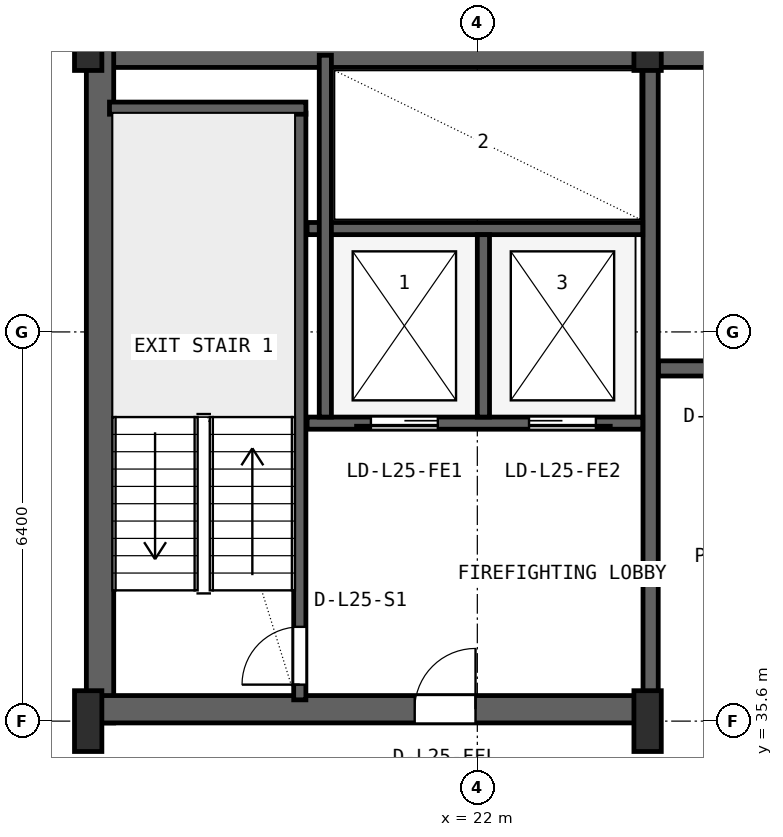
"""IFC4 building model, lengths in metres.
Left out: names, types, materials, properties, quantities, classifications, styles, units other than length and angle.
Written with IfcOpenShell. Run it as: python <this file> out.ifc"""

import sys

from ifc_helpers import new_model, si_unit, direction, frame, frame_2d, origin, origin_2d, place, context, subcontext, project, spatial, rectangle, i_section, extrude, source, transform, mapped, element, fill, save


model = new_model("IFC4")
c1 = context("Model", 3, precision=1e-05, world=origin(), true_north=direction((0.0, 1.0)))
c2 = subcontext(c1, "Body", "Model", "MODEL_VIEW")
j1 = project(units=[si_unit("LENGTHUNIT", "METRE"), si_unit("PLANEANGLEUNIT", "RADIAN")], contexts=[c1])
p1 = place(None, origin())
s1 = spatial("IfcSite", under=j1, at=p1, CompositionType="ELEMENT")
p2 = place(p1, origin())
s2 = spatial("IfcBuilding", under=s1, at=p2, CompositionType="ELEMENT")
p3 = place(p2, frame((0.0, 0.0, 106.8)))
s3 = spatial("IfcBuildingStorey", under=s2, at=p3, CompositionType="ELEMENT", Elevation=106.8)
p4 = place(p3, frame((15.6, 46.575, 0.0), z_axis=(0.0, 0.0, 1.0), x_axis=(1.0, 0.0, 0.0)))
e1 = element("IfcWall", 1, at=p4, inside=s3, PredefinedType="SHEAR", context=c2, shape_type="SweptSolid", body=[
    extrude(rectangle(XDim=36.8, YDim=0.45, at=frame_2d((18.4, 0.0))), origin(), (0.0, 0.0, 1.0), 3.55),
])
p5 = place(p3, frame((15.795, 35.57, 0.0), z_axis=(0.0, 0.0, 1.0), x_axis=(0.0, 1.0, 0.0)))
e2 = element("IfcWall", 2, at=p5, inside=s3, PredefinedType="SHEAR", context=c2, shape_type="SweptSolid", body=[
    extrude(rectangle(XDim=11.23, YDim=0.45, at=frame_2d((5.615, 0.0))), origin(), (0.0, 0.0, 1.0), 3.55),
])
p6 = place(p3, frame((15.57, 35.795, 0.0), z_axis=(0.0, 0.0, 1.0), x_axis=(1.0, 0.0, 0.0)))
e3 = element("IfcWall", 3, at=p6, inside=s3, PredefinedType="SHEAR", context=c2, shape_type="SweptSolid", body=[
    extrude(rectangle(XDim=9.23, YDim=0.45, at=frame_2d((4.615, 0.0))), origin(), (0.0, 0.0, 1.0), 3.55),
])
p7 = place(p6, frame((5.4, 0.0, 0.0)))
e4 = element("IfcOpeningElement", 4, at=p7, cuts=e3, PredefinedType="OPENING", context=c2, shape_type="SweptSolid", body=[
    extrude(rectangle(XDim=1.0, YDim=2.1, at=frame_2d((0.5, 1.05))), frame((0.0, 0.235, 0.0), z_axis=(0.0, -1.0, 0.0), x_axis=(1.0, 0.0, 0.0)), (0.0, 0.0, 1.0), 0.47),
])
m1 = source(origin(), c2, "Body", "SweptSolid", [
    extrude(i_section(OverallWidth=0.45, OverallDepth=1.0, WebThickness=0.016, FlangeThickness=0.03, FilletRadius=0.016, at=origin_2d()), origin(), (0.0, 0.0, 1.0), 3.8),
])
for number, where, z_axis, x_axis in (
    (5, (15.6, 35.6, 0.0), (0.0, 0.0, 1.0), (1.0, 0.0, 0.0)),
    (6, (15.6, 46.8, 0.0), (0.0, 0.0, 1.0), (1.0, 0.0, 0.0)),
    (7, (24.8, 35.6, 0.0), (0.0, 0.0, 1.0), (1.0, 0.0, 0.0)),
    (8, (24.8, 46.8, 0.0), (0.0, 0.0, 1.0), (1.0, 0.0, 0.0)),
):
    element("IfcColumn", number, at=place(p3, frame(where, z_axis=z_axis, x_axis=x_axis)), inside=s3, PredefinedType="COLUMN", context=c2, shape_type="MappedRepresentation", body=[
        mapped(m1, transform((0.0, 0.0, 0.0), x_axis=(1.0, 0.0, 0.0), y_axis=(0.0, 1.0, 0.0), z_axis=(0.0, 0.0, 1.0), scale=1.0)),
    ])
p8 = place(p3, frame((19.08, 35.95, 0.0), z_axis=(0.0, 0.0, 1.0), x_axis=(0.0, 1.0, 0.0)))
e9 = element("IfcWall", 9, at=p8, inside=s3, PredefinedType="SHEAR", context=c2, shape_type="SweptSolid", body=[
    extrude(rectangle(XDim=9.65, YDim=0.2, at=frame_2d((4.825, 0.0))), origin(), (0.0, 0.0, 1.0), 3.55),
])
p9 = place(p8, frame((0.25, 0.0, 0.0)))
e10 = element("IfcOpeningElement", 10, at=p9, cuts=e9, PredefinedType="OPENING", context=c2, shape_type="SweptSolid", body=[
    extrude(rectangle(XDim=0.95, YDim=2.1, at=frame_2d((0.475, 1.05))), frame((0.0, 0.11, 0.0), z_axis=(0.0, -1.0, 0.0), x_axis=(1.0, 0.0, 0.0)), (0.0, 0.0, 1.0), 0.22),
])
p10 = place(p3, frame((15.95, 45.68, 0.0), z_axis=(0.0, 0.0, 1.0), x_axis=(1.0, 0.0, 0.0)))
e11 = element("IfcWall", 11, at=p10, inside=s3, PredefinedType="SHEAR", context=c2, shape_type="SweptSolid", body=[
    extrude(rectangle(XDim=3.23, YDim=0.2, at=frame_2d((1.615, 0.0))), origin(), (0.0, 0.0, 1.0), 3.55),
])
p11 = place(p3, frame((24.85, 36.05, 0.0), z_axis=(0.0, 0.0, 1.0), x_axis=(0.0, 1.0, 0.0)))
e12 = element("IfcWall", 12, at=p11, inside=s3, PredefinedType="SHEAR", context=c2, shape_type="SweptSolid", body=[
    extrude(rectangle(XDim=10.45, YDim=0.25, at=frame_2d((5.225, 0.0))), origin(), (0.0, 0.0, 1.0), 3.55),
])
p12 = place(p3, frame((19.2, 40.5, 0.0), z_axis=(0.0, 0.0, 1.0), x_axis=(1.0, 0.0, 0.0)))
e13 = element("IfcWall", 13, at=p12, inside=s3, PredefinedType="SHEAR", context=c2, shape_type="SweptSolid", body=[
    extrude(rectangle(XDim=5.52, YDim=0.2, at=frame_2d((2.76, 0.0))), origin(), (0.0, 0.0, 1.0), 3.55),
])
p13 = place(p12, frame((1.05, 0.0, 0.0)))
e14 = element("IfcOpeningElement", 14, at=p13, cuts=e13, PredefinedType="OPENING", context=c2, shape_type="SweptSolid", body=[
    extrude(rectangle(XDim=1.1, YDim=2.18, at=frame_2d((0.55, 1.09))), frame((0.0, 0.11, 0.0), z_axis=(0.0, -1.0, 0.0), x_axis=(1.0, 0.0, 0.0)), (0.0, 0.0, 1.0), 0.22),
])
p14 = place(p12, frame((3.65, 0.0, 0.0)))
e15 = element("IfcOpeningElement", 15, at=p14, cuts=e13, PredefinedType="OPENING", context=c2, shape_type="SweptSolid", body=[
    extrude(rectangle(XDim=1.1, YDim=2.18, at=frame_2d((0.55, 1.09))), frame((0.0, 0.11, 0.0), z_axis=(0.0, -1.0, 0.0), x_axis=(1.0, 0.0, 0.0)), (0.0, 0.0, 1.0), 0.22),
])
p15 = place(p3, frame((19.2, 43.7, 0.0), z_axis=(0.0, 0.0, 1.0), x_axis=(1.0, 0.0, 0.0)))
e16 = element("IfcWall", 16, at=p15, inside=s3, PredefinedType="SHEAR", context=c2, shape_type="SweptSolid", body=[
    extrude(rectangle(XDim=5.52, YDim=0.2, at=frame_2d((2.76, 0.0))), origin(), (0.0, 0.0, 1.0), 3.55),
])
p16 = place(p3, frame((22.1, 40.6, 0.0), z_axis=(0.0, 0.0, 1.0), x_axis=(0.0, 1.0, 0.0)))
e17 = element("IfcWall", 17, at=p16, inside=s3, PredefinedType="SHEAR", context=c2, shape_type="SweptSolid", body=[
    extrude(rectangle(XDim=3.0, YDim=0.2, at=frame_2d((1.5, 0.0))), origin(), (0.0, 0.0, 1.0), 3.55),
])
p17 = place(p3, frame((19.5, 40.6, 0.0), z_axis=(0.0, 0.0, 1.0), x_axis=(0.0, 1.0, 0.0)))
e18 = element("IfcWall", 18, at=p17, inside=s3, PredefinedType="SHEAR", context=c2, shape_type="SweptSolid", body=[
    extrude(rectangle(XDim=5.95, YDim=0.2, at=frame_2d((2.975, 0.0))), origin(), (0.0, 0.0, 1.0), 3.55),
])
p18 = place(p3, frame((24.98, 41.4, 0.0), z_axis=(0.0, 0.0, 1.0), x_axis=(1.0, 0.0, 0.0)))
e19 = element("IfcWall", 19, at=p18, inside=s3, PredefinedType="SHEAR", context=c2, shape_type="SweptSolid", body=[
    extrude(rectangle(XDim=23.82, YDim=0.25, at=frame_2d((11.91, 0.0))), origin(), (0.0, 0.0, 1.0), 3.55),
])
p19 = place(p18, frame((8.87, 0.0, 0.0)))
e20 = element("IfcOpeningElement", 20, at=p19, cuts=e19, PredefinedType="OPENING", context=c2, shape_type="SweptSolid", body=[
    extrude(rectangle(XDim=1.1, YDim=2.18, at=frame_2d((0.55, 1.09))), frame((0.0, 0.135, 0.0), z_axis=(0.0, -1.0, 0.0), x_axis=(1.0, 0.0, 0.0)), (0.0, 0.0, 1.0), 0.27),
])
p20 = place(p18, frame((11.47, 0.0, 0.0)))
e21 = element("IfcOpeningElement", 21, at=p20, cuts=e19, PredefinedType="OPENING", context=c2, shape_type="SweptSolid", body=[
    extrude(rectangle(XDim=1.1, YDim=2.18, at=frame_2d((0.55, 1.09))), frame((0.0, 0.135, 0.0), z_axis=(0.0, -1.0, 0.0), x_axis=(1.0, 0.0, 0.0)), (0.0, 0.0, 1.0), 0.27),
])
p21 = place(p18, frame((14.07, 0.0, 0.0)))
e22 = element("IfcOpeningElement", 22, at=p21, cuts=e19, PredefinedType="OPENING", context=c2, shape_type="SweptSolid", body=[
    extrude(rectangle(XDim=1.1, YDim=2.18, at=frame_2d((0.55, 1.09))), frame((0.0, 0.135, 0.0), z_axis=(0.0, -1.0, 0.0), x_axis=(1.0, 0.0, 0.0)), (0.0, 0.0, 1.0), 0.27),
])
p22 = place(p18, frame((0.96, 0.0, 0.0)))
e23 = element("IfcOpeningElement", 23, at=p22, cuts=e19, PredefinedType="OPENING", context=c2, shape_type="SweptSolid", body=[
    extrude(rectangle(XDim=1.0, YDim=2.08, at=frame_2d((0.5, 1.04))), frame((0.0, 0.135, 0.0), z_axis=(0.0, -1.0, 0.0), x_axis=(1.0, 0.0, 0.0)), (0.0, 0.0, 1.0), 0.27),
])
p23 = place(p18, frame((3.56, 0.0, 0.0)))
e24 = element("IfcOpeningElement", 24, at=p23, cuts=e19, PredefinedType="OPENING", context=c2, shape_type="SweptSolid", body=[
    extrude(rectangle(XDim=1.0, YDim=2.08, at=frame_2d((0.5, 1.04))), frame((0.0, 0.135, 0.0), z_axis=(0.0, -1.0, 0.0), x_axis=(1.0, 0.0, 0.0)), (0.0, 0.0, 1.0), 0.27),
])
p24 = place(p18, frame((6.16, 0.0, 0.0)))
e25 = element("IfcOpeningElement", 25, at=p24, cuts=e19, PredefinedType="OPENING", context=c2, shape_type="SweptSolid", body=[
    extrude(rectangle(XDim=0.92, YDim=2.08, at=frame_2d((0.46, 1.04))), frame((0.0, 0.135, 0.0), z_axis=(0.0, -1.0, 0.0), x_axis=(1.0, 0.0, 0.0)), (0.0, 0.0, 1.0), 0.27),
])
m2 = source(origin(), c2, "Body", "SweptSolid", [
    extrude(rectangle(XDim=0.95, YDim=2.1, at=frame_2d((0.475, 1.05))), frame((0.0, 0.025, 0.0), z_axis=(0.0, -1.0, 0.0), x_axis=(1.0, 0.0, 0.0)), (0.0, 0.0, 1.0), 0.05),
])
p25 = place(p9, origin())
e26 = element("IfcDoor", 26, at=p25, inside=s3, OperationType="SINGLE_SWING_LEFT", PredefinedType="DOOR", context=c2, shape_type="MappedRepresentation", body=[
    mapped(m2, transform((0.0, 0.0, 0.0), x_axis=(1.0, 0.0, 0.0), y_axis=(0.0, 1.0, 0.0), z_axis=(0.0, 0.0, 1.0), scale=1.0)),
])
fill(e10, e26)
m3 = source(origin(), c2, "Body", "SweptSolid", [
    extrude(rectangle(XDim=1.0, YDim=2.1, at=frame_2d((0.5, 1.05))), frame((0.0, 0.025, 0.0), z_axis=(0.0, -1.0, 0.0), x_axis=(1.0, 0.0, 0.0)), (0.0, 0.0, 1.0), 0.05),
])
p26 = place(p7, origin())
e27 = element("IfcDoor", 27, at=p26, inside=s3, OperationType="SINGLE_SWING_RIGHT", PredefinedType="DOOR", context=c2, shape_type="MappedRepresentation", body=[
    mapped(m3, transform((0.0, 0.0, 0.0), x_axis=(1.0, 0.0, 0.0), y_axis=(0.0, 1.0, 0.0), z_axis=(0.0, 0.0, 1.0), scale=1.0)),
])
fill(e4, e27)
m4 = source(origin(), c2, "Body", "SweptSolid", [
    extrude(rectangle(XDim=1.1, YDim=2.18, at=frame_2d((0.55, 1.09))), frame((0.0, 0.025, 0.0), z_axis=(0.0, -1.0, 0.0), x_axis=(1.0, 0.0, 0.0)), (0.0, 0.0, 1.0), 0.05),
])
p27 = place(p13, frame((1.1, 0.0, 0.0), z_axis=(0.0, 0.0, 1.0), x_axis=(-1.0, 0.0, 0.0)))
e28 = element("IfcDoor", 28, at=p27, inside=s3, OperationType="SLIDING_TO_LEFT", PredefinedType="DOOR", context=c2, shape_type="MappedRepresentation", body=[
    mapped(m4, transform((0.0, 0.0, 0.0), x_axis=(1.0, 0.0, 0.0), y_axis=(0.0, 1.0, 0.0), z_axis=(0.0, 0.0, 1.0), scale=1.0)),
])
fill(e14, e28)
p28 = place(p14, frame((1.1, 0.0, 0.0), z_axis=(0.0, 0.0, 1.0), x_axis=(-1.0, 0.0, 0.0)))
e29 = element("IfcDoor", 29, at=p28, inside=s3, OperationType="SLIDING_TO_RIGHT", PredefinedType="DOOR", context=c2, shape_type="MappedRepresentation", body=[
    mapped(m4, transform((0.0, 0.0, 0.0), x_axis=(1.0, 0.0, 0.0), y_axis=(0.0, 1.0, 0.0), z_axis=(0.0, 0.0, 1.0), scale=1.0)),
])
fill(e15, e29)
save(model, sys.argv[1])
